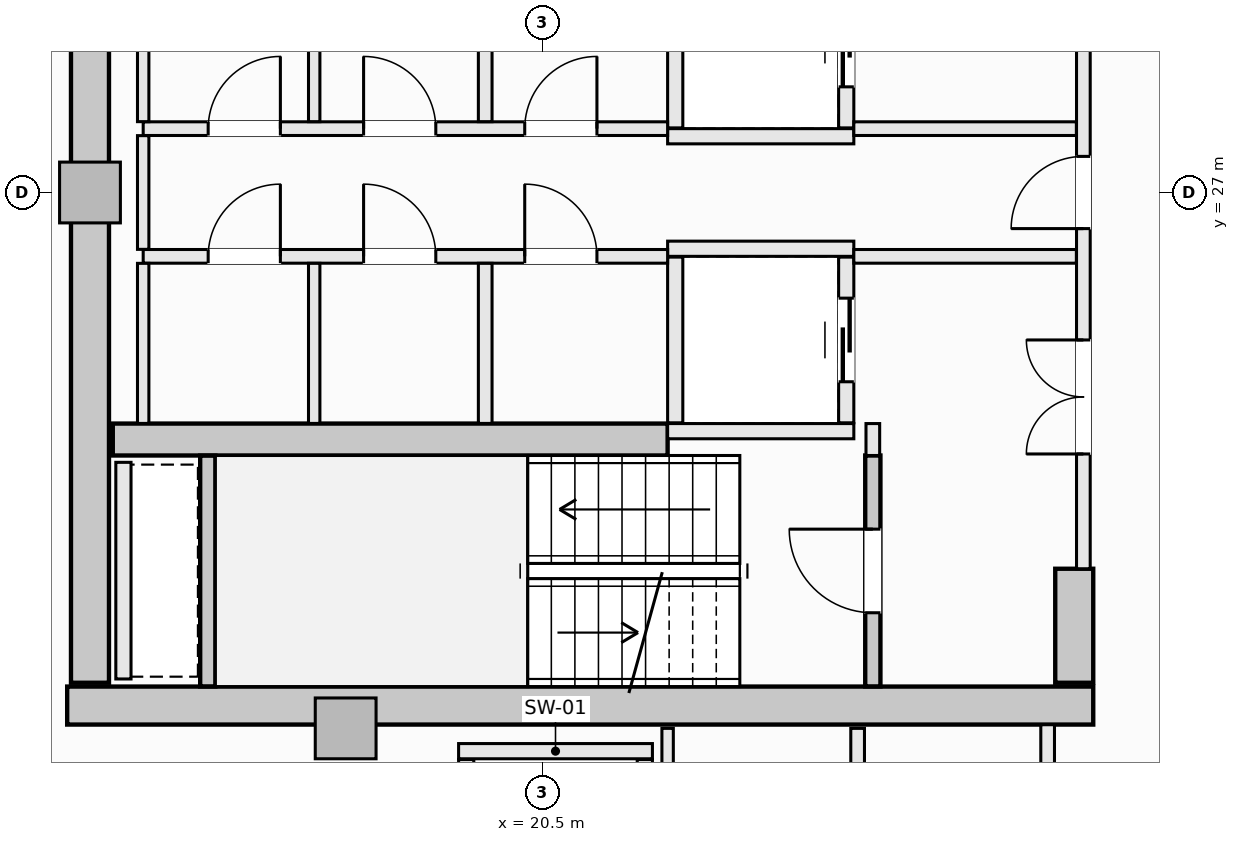
"""IFC4 building model, lengths in metres.
Left out: names, types, materials, properties, quantities, classifications, styles, units other than length and angle.
Written with IfcOpenShell. Run it as: python <this file> out.ifc"""

import sys

from ifc_helpers import new_model, si_unit, direction, frame, frame_2d, origin, origin_2d, place, context, subcontext, project, spatial, rectangle, extrude, element, fill, save


model = new_model("IFC4")
c1 = context("Model", 3, precision=1e-05, world=origin(), true_north=direction((0.0, 1.0)))
c2 = subcontext(c1, "Body", "Model", "MODEL_VIEW")
j1 = project(units=[si_unit("LENGTHUNIT", "METRE"), si_unit("PLANEANGLEUNIT", "RADIAN")], contexts=[c1])
p1 = place(None, origin())
s1 = spatial("IfcSite", under=j1, at=p1, CompositionType="ELEMENT")
p2 = place(p1, origin())
s2 = spatial("IfcBuilding", under=s1, at=p2, CompositionType="ELEMENT")
p3 = place(p2, frame((0.0, 0.0, 226.1)))
s3 = spatial("IfcBuildingStorey", under=s2, at=p3, CompositionType="ELEMENT", Elevation=226.1)
p4 = place(p3, frame((14.25, 20.25, -0.27), z_axis=(0.0, 0.0, 1.0), x_axis=(1.0, 0.0, 0.0)))
e1 = element("IfcWall", 1, at=p4, inside=s3, PredefinedType="SHEAR", context=c2, shape_type="SweptSolid", body=[
    extrude(rectangle(XDim=13.5, YDim=0.5, at=frame_2d((6.75, 0.0))), origin(), (0.0, 0.0, 1.0), 3.3),
])
p5 = place(p3, frame((14.55, 20.55, -0.27), z_axis=(0.0, 0.0, 1.0), x_axis=(0.0, 1.0, 0.0)))
e2 = element("IfcWall", 2, at=p5, inside=s3, PredefinedType="SHEAR", context=c2, shape_type="SweptSolid", body=[
    extrude(rectangle(XDim=12.9, YDim=0.5, at=frame_2d((6.45, 0.0))), origin(), (0.0, 0.0, 1.0), 3.3),
])
p6 = place(p3, frame((27.5, 20.55, -0.27), z_axis=(0.0, 0.0, 1.0), x_axis=(0.0, 1.0, 0.0)))
e3 = element("IfcWall", 3, at=p6, inside=s3, PredefinedType="SHEAR", context=c2, shape_type="SweptSolid", body=[
    extrude(rectangle(XDim=1.5, YDim=0.5, at=frame_2d((0.75, 0.0))), origin(), (0.0, 0.0, 1.0), 3.3),
])
p7 = place(p3, frame((14.85, 23.75, -0.27), z_axis=(0.0, 0.0, 1.0), x_axis=(1.0, 0.0, 0.0)))
e4 = element("IfcWall", 4, at=p7, inside=s3, PredefinedType="SHEAR", context=c2, shape_type="SweptSolid", body=[
    extrude(rectangle(XDim=7.3, YDim=0.42, at=frame_2d((3.65, 0.0))), origin(), (0.0, 0.0, 1.0), 3.3),
])
for number, where, z_axis, x_axis in (
    (5, (14.55, 27.0, -0.27), (0.0, 0.0, 1.0), (1.0, 0.0, 0.0)),
    (6, (17.914, 19.95, -0.27), (0.0, 0.0, 1.0), (1.0, 0.0, 0.0)),
):
    element("IfcColumn", number, at=place(p3, frame(where, z_axis=z_axis, x_axis=x_axis)), inside=s3, PredefinedType="PILASTER", context=c2, shape_type="SweptSolid", body=[
        extrude(rectangle(XDim=0.8, YDim=0.8, at=origin_2d()), origin(), (0.0, 0.0, 1.0), 3.3),
    ])
p8 = place(p3, frame((24.85, 20.502, -0.27), z_axis=(0.0, 0.0, 1.0), x_axis=(0.0, 1.0, 0.0)))
e7 = element("IfcWall", 7, at=p8, inside=s3, PredefinedType="SHEAR", context=c2, shape_type="SweptSolid", body=[
    extrude(rectangle(XDim=3.038, YDim=0.2, at=frame_2d((1.519, 0.0))), origin(), (0.0, 0.0, 1.0), 3.3),
])
p9 = place(p8, frame((0.969, 0.0, 0.27)))
e8 = element("IfcOpeningElement", 8, at=p9, cuts=e7, PredefinedType="OPENING", context=c2, shape_type="SweptSolid", body=[
    extrude(rectangle(XDim=1.1, YDim=2.15, at=frame_2d((0.55, 1.075))), frame((0.0, 0.11, 0.0), z_axis=(0.0, -1.0, 0.0), x_axis=(1.0, 0.0, 0.0)), (0.0, 0.0, 1.0), 0.22),
])
p10 = place(p3, frame((16.1, 20.502, -0.27), z_axis=(0.0, 0.0, 1.0), x_axis=(0.0, 1.0, 0.0)))
e9 = element("IfcWall", 9, at=p10, inside=s3, PredefinedType="SHEAR", context=c2, shape_type="SweptSolid", body=[
    extrude(rectangle(XDim=3.036, YDim=0.2, at=frame_2d((1.518, 0.0))), origin(), (0.0, 0.0, 1.0), 3.3),
])
p11 = place(p3, frame((22.15, 27.74, 0.0), z_axis=(0.0, 0.0, 1.0), x_axis=(1.0, 0.0, 0.0)))
e10 = element("IfcWall", 10, at=p11, inside=s3, PredefinedType="SOLIDWALL", context=c2, shape_type="SweptSolid", body=[
    extrude(rectangle(XDim=2.45, YDim=0.2, at=frame_2d((1.225, 0.0))), origin(), (0.0, 0.0, 1.0), 3.03),
])
p12 = place(p3, frame((22.25, 27.85, 0.0), z_axis=(0.0, 0.0, 1.0), x_axis=(0.0, 1.0, 0.0)))
e11 = element("IfcWall", 11, at=p12, inside=s3, PredefinedType="SOLIDWALL", context=c2, shape_type="SweptSolid", body=[
    extrude(rectangle(XDim=2.18, YDim=0.2, at=frame_2d((1.09, 0.0))), origin(), (0.0, 0.0, 1.0), 3.03),
])
p13 = place(p3, frame((24.5, 27.85, 0.0), z_axis=(0.0, 0.0, 1.0), x_axis=(0.0, 1.0, 0.0)))
e12 = element("IfcWall", 12, at=p13, inside=s3, PredefinedType="SOLIDWALL", context=c2, shape_type="SweptSolid", body=[
    extrude(rectangle(XDim=2.18, YDim=0.2, at=frame_2d((1.09, 0.0))), origin(), (0.0, 0.0, 1.0), 3.03),
])
p14 = place(p13, frame((0.54, 0.0, 0.0)))
e13 = element("IfcOpeningElement", 13, at=p14, cuts=e12, PredefinedType="OPENING", context=c2, shape_type="SweptSolid", body=[
    extrude(rectangle(XDim=1.1, YDim=2.2, at=frame_2d((0.55, 1.1))), frame((0.0, 0.11, 0.0), z_axis=(0.0, -1.0, 0.0), x_axis=(1.0, 0.0, 0.0)), (0.0, 0.0, 1.0), 0.22),
])
for number, where, z_axis, x_axis in (
    (14, (22.15, 26.26, 0.0), (0.0, 0.0, 1.0), (1.0, 0.0, 0.0)),
    (15, (22.15, 23.86, 0.0), (0.0, 0.0, 1.0), (1.0, 0.0, 0.0)),
):
    element("IfcWall", number, at=place(p3, frame(where, z_axis=z_axis, x_axis=x_axis)), inside=s3, PredefinedType="SOLIDWALL", context=c2, shape_type="SweptSolid", body=[
        extrude(rectangle(XDim=2.45, YDim=0.2, at=frame_2d((1.225, 0.0))), origin(), (0.0, 0.0, 1.0), 3.03),
    ])
p15 = place(p3, frame((22.25, 23.97, 0.0), z_axis=(0.0, 0.0, 1.0), x_axis=(0.0, 1.0, 0.0)))
e16 = element("IfcWall", 16, at=p15, inside=s3, PredefinedType="SOLIDWALL", context=c2, shape_type="SweptSolid", body=[
    extrude(rectangle(XDim=2.18, YDim=0.2, at=frame_2d((1.09, 0.0))), origin(), (0.0, 0.0, 1.0), 3.03),
])
p16 = place(p3, frame((24.5, 23.97, 0.0), z_axis=(0.0, 0.0, 1.0), x_axis=(0.0, 1.0, 0.0)))
e17 = element("IfcWall", 17, at=p16, inside=s3, PredefinedType="SOLIDWALL", context=c2, shape_type="SweptSolid", body=[
    extrude(rectangle(XDim=2.18, YDim=0.2, at=frame_2d((1.09, 0.0))), origin(), (0.0, 0.0, 1.0), 3.03),
])
p17 = place(p16, frame((0.54, 0.0, 0.0)))
e18 = element("IfcOpeningElement", 18, at=p17, cuts=e17, PredefinedType="OPENING", context=c2, shape_type="SweptSolid", body=[
    extrude(rectangle(XDim=1.1, YDim=2.2, at=frame_2d((0.55, 1.1))), frame((0.0, 0.11, 0.0), z_axis=(0.0, -1.0, 0.0), x_axis=(1.0, 0.0, 0.0)), (0.0, 0.0, 1.0), 0.22),
])
p18 = place(p3, frame((19.4, 19.65, 0.0), z_axis=(0.0, 0.0, 1.0), x_axis=(1.0, 0.0, 0.0)))
e19 = element("IfcWall", 19, at=p18, inside=s3, PredefinedType="SOLIDWALL", context=c2, shape_type="SweptSolid", body=[
    extrude(rectangle(XDim=2.55, YDim=0.2, at=frame_2d((1.275, 0.0))), origin(), (0.0, 0.0, 1.0), 3.03),
])
for number, where, z_axis, x_axis in (
    (20, (19.5, 17.01, 0.0), (0.0, 0.0, 1.0), (0.0, 1.0, 0.0)),
    (21, (21.85, 17.01, 0.0), (0.0, 0.0, 1.0), (0.0, 1.0, 0.0)),
):
    element("IfcWall", number, at=place(p3, frame(where, z_axis=z_axis, x_axis=x_axis)), inside=s3, PredefinedType="SOLIDWALL", context=c2, shape_type="SweptSolid", body=[
        extrude(rectangle(XDim=2.53, YDim=0.2, at=frame_2d((1.265, 0.0))), origin(), (0.0, 0.0, 1.0), 3.03),
    ])
p19 = place(p3, frame((14.99, 20.6, 0.0), z_axis=(0.0, 0.0, 1.0), x_axis=(0.0, 1.0, 0.0)))
e22 = element("IfcWall", 22, at=p19, inside=s3, PredefinedType="SOLIDWALL", context=c2, shape_type="SweptSolid", body=[
    extrude(rectangle(XDim=2.85, YDim=0.2, at=frame_2d((1.425, 0.0))), origin(), (0.0, 0.0, 1.0), 3.03),
])
p20 = place(p3, frame((24.85, 23.54, 0.0), z_axis=(0.0, 0.0, 1.0), x_axis=(0.0, 1.0, 0.0)))
e23 = element("IfcWall", 23, at=p20, inside=s3, PredefinedType="SOLIDWALL", context=c2, shape_type="SweptSolid", body=[
    extrude(rectangle(XDim=0.42, YDim=0.18, at=frame_2d((0.21, 0.0))), origin(), (0.0, 0.0, 1.0), 3.03),
])
p21 = place(p3, frame((27.62, 22.05, 0.0), z_axis=(0.0, 0.0, 1.0), x_axis=(0.0, 1.0, 0.0)))
e24 = element("IfcWall", 24, at=p21, inside=s3, PredefinedType="SOLIDWALL", context=c2, shape_type="SweptSolid", body=[
    extrude(rectangle(XDim=9.9, YDim=0.18, at=frame_2d((4.95, 0.0))), origin(), (0.0, 0.0, 1.0), 3.03),
])
p22 = place(p21, frame((4.475, 0.0, 0.0)))
e25 = element("IfcOpeningElement", 25, at=p22, cuts=e24, PredefinedType="OPENING", context=c2, shape_type="SweptSolid", body=[
    extrude(rectangle(XDim=0.95, YDim=2.1, at=frame_2d((0.475, 1.05))), frame((0.0, 0.1, 0.0), z_axis=(0.0, -1.0, 0.0), x_axis=(1.0, 0.0, 0.0)), (0.0, 0.0, 1.0), 0.2),
])
p23 = place(p21, frame((6.89, 0.0, 0.0)))
e26 = element("IfcOpeningElement", 26, at=p23, cuts=e24, PredefinedType="OPENING", context=c2, shape_type="SweptSolid", body=[
    extrude(rectangle(XDim=1.5, YDim=2.2, at=frame_2d((0.75, 1.1))), frame((0.0, 0.1, 0.0), z_axis=(0.0, -1.0, 0.0), x_axis=(1.0, 0.0, 0.0)), (0.0, 0.0, 1.0), 0.2),
])
p24 = place(p21, frame((1.51, 0.0, 0.0)))
e27 = element("IfcOpeningElement", 27, at=p24, cuts=e24, PredefinedType="OPENING", context=c2, shape_type="SweptSolid", body=[
    extrude(rectangle(XDim=1.5, YDim=2.2, at=frame_2d((0.75, 1.1))), frame((0.0, 0.1, 0.0), z_axis=(0.0, -1.0, 0.0), x_axis=(1.0, 0.0, 0.0)), (0.0, 0.0, 1.0), 0.2),
])
p25 = place(p3, frame((15.25, 27.84, 0.0), z_axis=(0.0, 0.0, 1.0), x_axis=(1.0, 0.0, 0.0)))
e28 = element("IfcWall", 28, at=p25, inside=s3, PredefinedType="SOLIDWALL", context=c2, shape_type="SweptSolid", body=[
    extrude(rectangle(XDim=6.9, YDim=0.18, at=frame_2d((3.45, 0.0))), origin(), (0.0, 0.0, 1.0), 3.03),
])
p26 = place(p25, frame((5.02, 0.0, 0.0)))
e29 = element("IfcOpeningElement", 29, at=p26, cuts=e28, PredefinedType="OPENING", context=c2, shape_type="SweptSolid", body=[
    extrude(rectangle(XDim=0.95, YDim=2.1, at=frame_2d((0.475, 1.05))), frame((0.0, 0.1, 0.0), z_axis=(0.0, -1.0, 0.0), x_axis=(1.0, 0.0, 0.0)), (0.0, 0.0, 1.0), 0.2),
])
p27 = place(p25, frame((0.855, 0.0, 0.0)))
e30 = element("IfcOpeningElement", 30, at=p27, cuts=e28, PredefinedType="OPENING", context=c2, shape_type="SweptSolid", body=[
    extrude(rectangle(XDim=0.95, YDim=2.1, at=frame_2d((0.475, 1.05))), frame((0.0, 0.1, 0.0), z_axis=(0.0, -1.0, 0.0), x_axis=(1.0, 0.0, 0.0)), (0.0, 0.0, 1.0), 0.2),
])
p28 = place(p25, frame((2.9, 0.0, 0.0)))
e31 = element("IfcOpeningElement", 31, at=p28, cuts=e28, PredefinedType="OPENING", context=c2, shape_type="SweptSolid", body=[
    extrude(rectangle(XDim=0.95, YDim=2.1, at=frame_2d((0.475, 1.05))), frame((0.0, 0.1, 0.0), z_axis=(0.0, -1.0, 0.0), x_axis=(1.0, 0.0, 0.0)), (0.0, 0.0, 1.0), 0.2),
])
p29 = place(p3, frame((24.6, 27.84, 0.0), z_axis=(0.0, 0.0, 1.0), x_axis=(1.0, 0.0, 0.0)))
e32 = element("IfcWall", 32, at=p29, inside=s3, PredefinedType="SOLIDWALL", context=c2, shape_type="SweptSolid", body=[
    extrude(rectangle(XDim=2.928, YDim=0.18, at=frame_2d((1.464, 0.0))), origin(), (0.0, 0.0, 1.0), 3.03),
])
p30 = place(p3, frame((15.25, 26.16, 0.0), z_axis=(0.0, 0.0, 1.0), x_axis=(1.0, 0.0, 0.0)))
e33 = element("IfcWall", 33, at=p30, inside=s3, PredefinedType="SOLIDWALL", context=c2, shape_type="SweptSolid", body=[
    extrude(rectangle(XDim=6.9, YDim=0.18, at=frame_2d((3.45, 0.0))), origin(), (0.0, 0.0, 1.0), 3.03),
])
p31 = place(p30, frame((5.02, 0.0, 0.0)))
e34 = element("IfcOpeningElement", 34, at=p31, cuts=e33, PredefinedType="OPENING", context=c2, shape_type="SweptSolid", body=[
    extrude(rectangle(XDim=0.95, YDim=2.1, at=frame_2d((0.475, 1.05))), frame((0.0, 0.1, 0.0), z_axis=(0.0, -1.0, 0.0), x_axis=(1.0, 0.0, 0.0)), (0.0, 0.0, 1.0), 0.2),
])
p32 = place(p30, frame((0.855, 0.0, 0.0)))
e35 = element("IfcOpeningElement", 35, at=p32, cuts=e33, PredefinedType="OPENING", context=c2, shape_type="SweptSolid", body=[
    extrude(rectangle(XDim=0.95, YDim=2.1, at=frame_2d((0.475, 1.05))), frame((0.0, 0.1, 0.0), z_axis=(0.0, -1.0, 0.0), x_axis=(1.0, 0.0, 0.0)), (0.0, 0.0, 1.0), 0.2),
])
p33 = place(p30, frame((2.9, 0.0, 0.0)))
e36 = element("IfcOpeningElement", 36, at=p33, cuts=e33, PredefinedType="OPENING", context=c2, shape_type="SweptSolid", body=[
    extrude(rectangle(XDim=0.95, YDim=2.1, at=frame_2d((0.475, 1.05))), frame((0.0, 0.1, 0.0), z_axis=(0.0, -1.0, 0.0), x_axis=(1.0, 0.0, 0.0)), (0.0, 0.0, 1.0), 0.2),
])
p34 = place(p3, frame((24.6, 26.16, 0.0), z_axis=(0.0, 0.0, 1.0), x_axis=(1.0, 0.0, 0.0)))
e37 = element("IfcWall", 37, at=p34, inside=s3, PredefinedType="SOLIDWALL", context=c2, shape_type="SweptSolid", body=[
    extrude(rectangle(XDim=2.928, YDim=0.18, at=frame_2d((1.464, 0.0))), origin(), (0.0, 0.0, 1.0), 3.03),
])
p35 = place(p3, frame((15.25, 23.962, 0.0), z_axis=(0.0, 0.0, 1.0), x_axis=(0.0, 1.0, 0.0)))
e38 = element("IfcWall", 38, at=p35, inside=s3, PredefinedType="PARTITIONING", context=c2, shape_type="SweptSolid", body=[
    extrude(rectangle(XDim=2.106, YDim=0.15, at=frame_2d((1.053, 0.0))), origin(), (0.0, 0.0, 1.0), 3.03),
])
p36 = place(p3, frame((15.25, 26.252, 0.0), z_axis=(0.0, 0.0, 1.0), x_axis=(0.0, 1.0, 0.0)))
e39 = element("IfcWall", 39, at=p36, inside=s3, PredefinedType="PARTITIONING", context=c2, shape_type="SweptSolid", body=[
    extrude(rectangle(XDim=1.496, YDim=0.15, at=frame_2d((0.748, 0.0))), origin(), (0.0, 0.0, 1.0), 3.03),
])
p37 = place(p3, frame((15.25, 27.932, 0.0), z_axis=(0.0, 0.0, 1.0), x_axis=(0.0, 1.0, 0.0)))
e40 = element("IfcWall", 40, at=p37, inside=s3, PredefinedType="PARTITIONING", context=c2, shape_type="SweptSolid", body=[
    extrude(rectangle(XDim=2.106, YDim=0.15, at=frame_2d((1.053, 0.0))), origin(), (0.0, 0.0, 1.0), 3.03),
])
for number, where, z_axis, x_axis in (
    (41, (19.75, 23.962, 0.0), (0.0, 0.0, 1.0), (0.0, 1.0, 0.0)),
    (42, (19.75, 27.932, 0.0), (0.0, 0.0, 1.0), (0.0, 1.0, 0.0)),
):
    element("IfcWall", number, at=place(p3, frame(where, z_axis=z_axis, x_axis=x_axis)), inside=s3, PredefinedType="SOLIDWALL", context=c2, shape_type="SweptSolid", body=[
        extrude(rectangle(XDim=2.106, YDim=0.18, at=frame_2d((1.053, 0.0))), origin(), (0.0, 0.0, 1.0), 3.03),
    ])
for number, where, z_axis, x_axis in (
    (43, (17.5, 23.962, 0.0), (0.0, 0.0, 1.0), (0.0, 1.0, 0.0)),
    (44, (17.5, 27.932, 0.0), (0.0, 0.0, 1.0), (0.0, 1.0, 0.0)),
):
    element("IfcWall", number, at=place(p3, frame(where, z_axis=z_axis, x_axis=x_axis)), inside=s3, PredefinedType="PARTITIONING", context=c2, shape_type="SweptSolid", body=[
        extrude(rectangle(XDim=2.106, YDim=0.15, at=frame_2d((1.053, 0.0))), origin(), (0.0, 0.0, 1.0), 3.03),
    ])
p38 = place(p3, frame((22.15, 17.142, 0.0), z_axis=(0.0, 0.0, 1.0), x_axis=(0.0, 1.0, 0.0)))
e45 = element("IfcWall", 45, at=p38, inside=s3, PredefinedType="PARTITIONING", context=c2, shape_type="SweptSolid", body=[
    extrude(rectangle(XDim=2.808, YDim=0.15, at=frame_2d((1.404, 0.0))), origin(), (0.0, 0.0, 1.0), 3.03),
])
p39 = place(p3, frame((24.65, 17.142, 0.0), z_axis=(0.0, 0.0, 1.0), x_axis=(0.0, 1.0, 0.0)))
e46 = element("IfcWall", 46, at=p39, inside=s3, PredefinedType="SOLIDWALL", context=c2, shape_type="SweptSolid", body=[
    extrude(rectangle(XDim=2.808, YDim=0.18, at=frame_2d((1.404, 0.0))), origin(), (0.0, 0.0, 1.0), 3.03),
])
p40 = place(p39, frame((0.929, 0.0, 0.0)))
e47 = element("IfcOpeningElement", 47, at=p40, cuts=e46, PredefinedType="OPENING", context=c2, shape_type="SweptSolid", body=[
    extrude(rectangle(XDim=0.95, YDim=2.1, at=frame_2d((0.475, 1.05))), frame((0.0, 0.1, 0.0), z_axis=(0.0, -1.0, 0.0), x_axis=(1.0, 0.0, 0.0)), (0.0, 0.0, 1.0), 0.2),
])
p41 = place(p3, frame((27.15, 17.142, 0.0), z_axis=(0.0, 0.0, 1.0), x_axis=(0.0, 1.0, 0.0)))
e48 = element("IfcWall", 48, at=p41, inside=s3, PredefinedType="SOLIDWALL", context=c2, shape_type="SweptSolid", body=[
    extrude(rectangle(XDim=2.856, YDim=0.18, at=frame_2d((1.428, 0.0))), origin(), (0.0, 0.0, 1.0), 3.03),
])
p42 = place(p41, frame((0.953, 0.0, 0.0)))
e49 = element("IfcOpeningElement", 49, at=p42, cuts=e48, PredefinedType="OPENING", context=c2, shape_type="SweptSolid", body=[
    extrude(rectangle(XDim=0.95, YDim=2.1, at=frame_2d((0.475, 1.05))), frame((0.0, 0.1, 0.0), z_axis=(0.0, -1.0, 0.0), x_axis=(1.0, 0.0, 0.0)), (0.0, 0.0, 1.0), 0.2),
])
p43 = place(p9, origin())
e50 = element("IfcDoor", 50, at=p43, inside=s3, OperationType="SINGLE_SWING_RIGHT", PredefinedType="DOOR", context=c2, shape_type="SweptSolid", body=[
    extrude(rectangle(XDim=1.1, YDim=2.15, at=frame_2d((0.55, 1.075))), frame((0.0, 0.025, 0.0), z_axis=(0.0, -1.0, 0.0), x_axis=(1.0, 0.0, 0.0)), (0.0, 0.0, 1.0), 0.05),
])
fill(e8, e50)
p44 = place(p14, origin())
e51 = element("IfcDoor", 51, at=p44, inside=s3, OperationType="SLIDING_TO_LEFT", PredefinedType="DOOR", context=c2, shape_type="SweptSolid", body=[
    extrude(rectangle(XDim=1.1, YDim=2.2, at=frame_2d((0.55, 1.1))), frame((0.0, 0.025, 0.0), z_axis=(0.0, -1.0, 0.0), x_axis=(1.0, 0.0, 0.0)), (0.0, 0.0, 1.0), 0.05),
])
fill(e13, e51)
p45 = place(p17, origin())
e52 = element("IfcDoor", 52, at=p45, inside=s3, OperationType="SLIDING_TO_LEFT", PredefinedType="DOOR", context=c2, shape_type="SweptSolid", body=[
    extrude(rectangle(XDim=1.1, YDim=2.2, at=frame_2d((0.55, 1.1))), frame((0.0, 0.025, 0.0), z_axis=(0.0, -1.0, 0.0), x_axis=(1.0, 0.0, 0.0)), (0.0, 0.0, 1.0), 0.05),
])
fill(e18, e52)
p46 = place(p22, origin())
e53 = element("IfcDoor", 53, at=p46, inside=s3, OperationType="SINGLE_SWING_LEFT", PredefinedType="DOOR", context=c2, shape_type="SweptSolid", body=[
    extrude(rectangle(XDim=0.95, YDim=2.1, at=frame_2d((0.475, 1.05))), frame((0.0, 0.025, 0.0), z_axis=(0.0, -1.0, 0.0), x_axis=(1.0, 0.0, 0.0)), (0.0, 0.0, 1.0), 0.05),
])
fill(e25, e53)
p47 = place(p24, origin())
e54 = element("IfcDoor", 54, at=p47, inside=s3, OperationType="DOUBLE_DOOR_SINGLE_SWING", PredefinedType="DOOR", context=c2, shape_type="SweptSolid", body=[
    extrude(rectangle(XDim=1.5, YDim=2.2, at=frame_2d((0.75, 1.1))), frame((0.0, 0.025, 0.0), z_axis=(0.0, -1.0, 0.0), x_axis=(1.0, 0.0, 0.0)), (0.0, 0.0, 1.0), 0.05),
])
fill(e27, e54)
p48 = place(p26, origin())
e55 = element("IfcDoor", 55, at=p48, inside=s3, OperationType="SINGLE_SWING_RIGHT", PredefinedType="DOOR", context=c2, shape_type="SweptSolid", body=[
    extrude(rectangle(XDim=0.95, YDim=2.1, at=frame_2d((0.475, 1.05))), frame((0.0, 0.025, 0.0), z_axis=(0.0, -1.0, 0.0), x_axis=(1.0, 0.0, 0.0)), (0.0, 0.0, 1.0), 0.05),
])
fill(e29, e55)
p49 = place(p31, origin())
e56 = element("IfcDoor", 56, at=p49, inside=s3, OperationType="SINGLE_SWING_LEFT", PredefinedType="DOOR", context=c2, shape_type="SweptSolid", body=[
    extrude(rectangle(XDim=0.95, YDim=2.1, at=frame_2d((0.475, 1.05))), frame((0.0, 0.025, 0.0), z_axis=(0.0, -1.0, 0.0), x_axis=(1.0, 0.0, 0.0)), (0.0, 0.0, 1.0), 0.05),
])
fill(e34, e56)
p50 = place(p27, origin())
e57 = element("IfcDoor", 57, at=p50, inside=s3, OperationType="SINGLE_SWING_RIGHT", PredefinedType="DOOR", context=c2, shape_type="SweptSolid", body=[
    extrude(rectangle(XDim=0.95, YDim=2.1, at=frame_2d((0.475, 1.05))), frame((0.0, 0.025, 0.0), z_axis=(0.0, -1.0, 0.0), x_axis=(1.0, 0.0, 0.0)), (0.0, 0.0, 1.0), 0.05),
])
fill(e30, e57)
p51 = place(p28, origin())
e58 = element("IfcDoor", 58, at=p51, inside=s3, OperationType="SINGLE_SWING_LEFT", PredefinedType="DOOR", context=c2, shape_type="SweptSolid", body=[
    extrude(rectangle(XDim=0.95, YDim=2.1, at=frame_2d((0.475, 1.05))), frame((0.0, 0.025, 0.0), z_axis=(0.0, -1.0, 0.0), x_axis=(1.0, 0.0, 0.0)), (0.0, 0.0, 1.0), 0.05),
])
fill(e31, e58)
p52 = place(p32, origin())
e59 = element("IfcDoor", 59, at=p52, inside=s3, OperationType="SINGLE_SWING_RIGHT", PredefinedType="DOOR", context=c2, shape_type="SweptSolid", body=[
    extrude(rectangle(XDim=0.95, YDim=2.1, at=frame_2d((0.475, 1.05))), frame((0.0, 0.025, 0.0), z_axis=(0.0, -1.0, 0.0), x_axis=(1.0, 0.0, 0.0)), (0.0, 0.0, 1.0), 0.05),
])
fill(e35, e59)
p53 = place(p33, origin())
e60 = element("IfcDoor", 60, at=p53, inside=s3, OperationType="SINGLE_SWING_LEFT", PredefinedType="DOOR", context=c2, shape_type="SweptSolid", body=[
    extrude(rectangle(XDim=0.95, YDim=2.1, at=frame_2d((0.475, 1.05))), frame((0.0, 0.025, 0.0), z_axis=(0.0, -1.0, 0.0), x_axis=(1.0, 0.0, 0.0)), (0.0, 0.0, 1.0), 0.05),
])
fill(e36, e60)
save(model, sys.argv[1])
